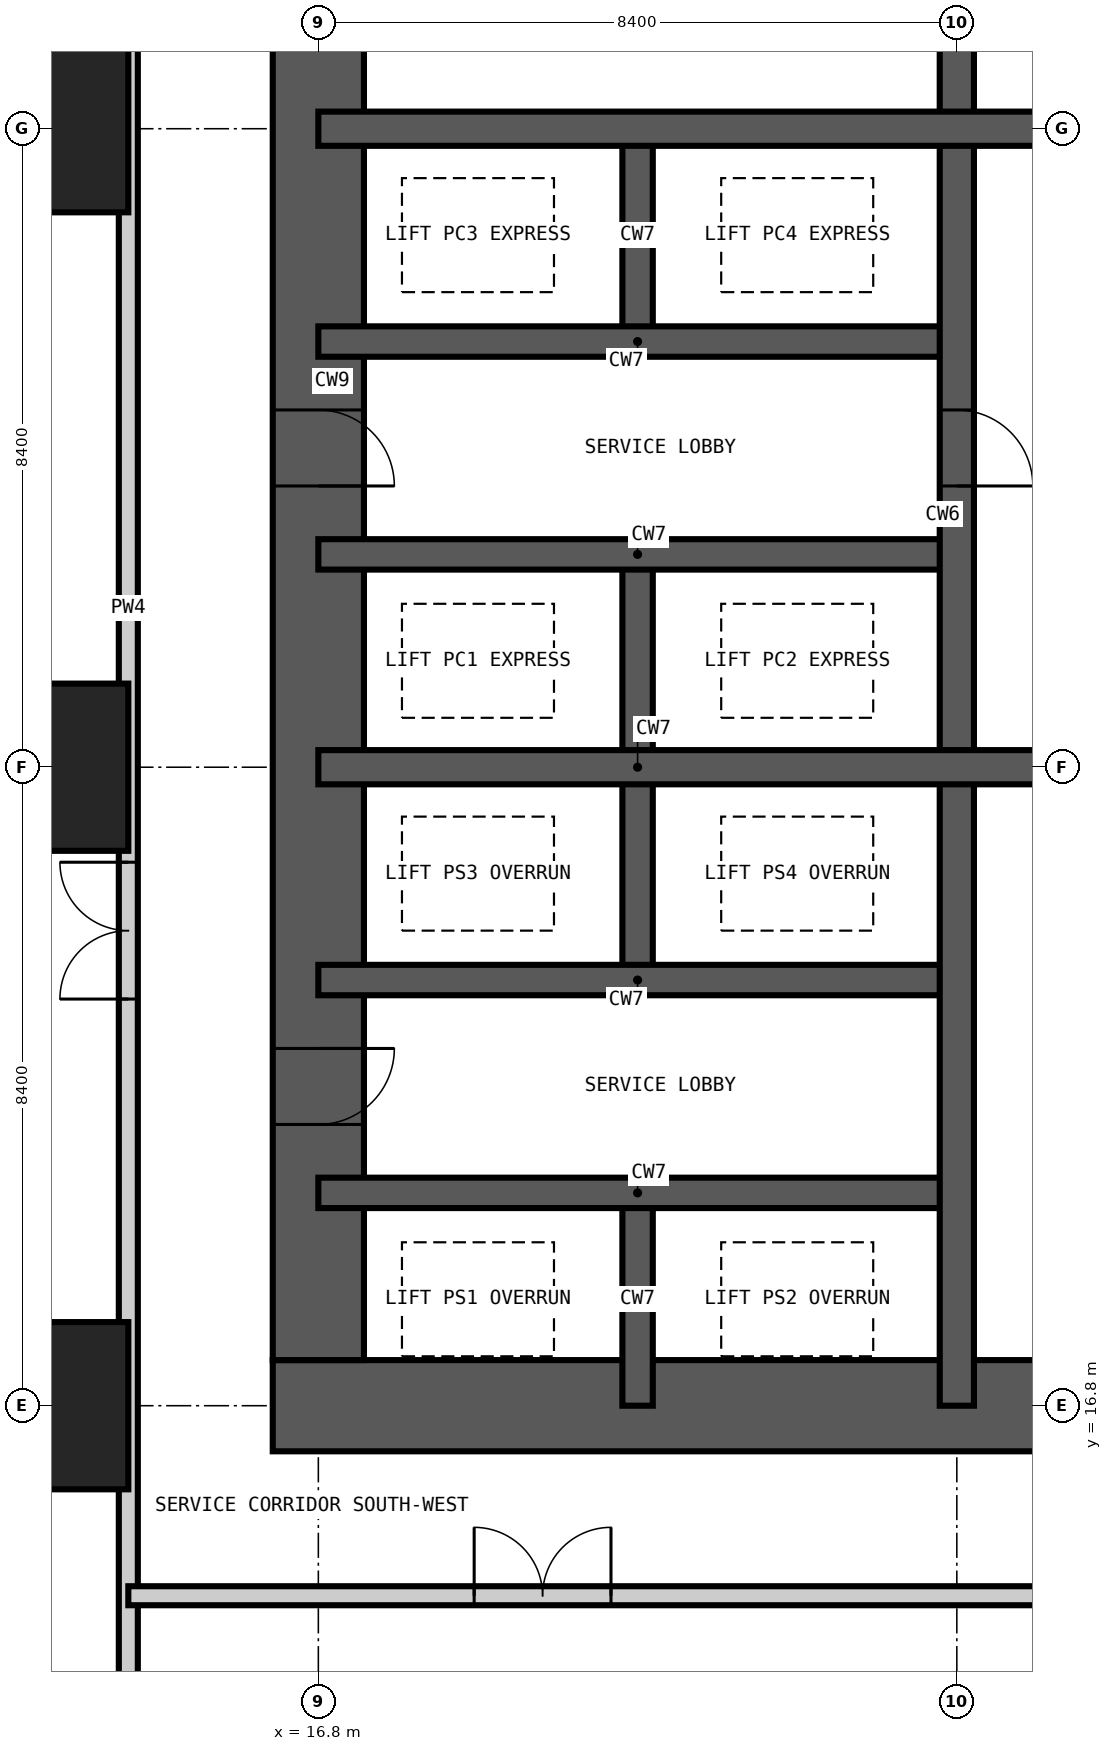
"""IFC4 building model, lengths in metres.
Left out: names, types, materials, properties, quantities, classifications, styles, units other than length and angle.
Written with IfcOpenShell. Run it as: python <this file> out.ifc"""

import sys

from ifc_helpers import new_model, si_unit, direction, frame, frame_2d, origin, origin_2d, place, context, subcontext, project, spatial, rectangle, extrude, element, fill, save


model = new_model("IFC4")
c1 = context("Model", 3, precision=1e-05, world=origin(), true_north=direction((0.0, 1.0)))
c2 = subcontext(c1, "Body", "Model", "MODEL_VIEW")
j1 = project(units=[si_unit("LENGTHUNIT", "METRE"), si_unit("PLANEANGLEUNIT", "RADIAN")], contexts=[c1])
p1 = place(None, origin())
s1 = spatial("IfcSite", under=j1, at=p1, CompositionType="ELEMENT")
p2 = place(p1, origin())
s2 = spatial("IfcBuilding", under=s1, at=p2, CompositionType="ELEMENT")
p3 = place(p2, frame((0.0, 0.0, 153.6)))
s3 = spatial("IfcBuildingStorey", under=s2, at=p3, CompositionType="ELEMENT", Elevation=153.6)
for number, where, z_axis, x_axis in (
    (1, (13.2, 16.8, -0.4), (0.0, 0.0, 1.0), (1.0, 0.0, 0.0)),
    (2, (13.2, 25.2, -0.4), (0.0, 0.0, 1.0), (1.0, 0.0, 0.0)),
    (3, (13.2, 33.6, -0.4), (0.0, 0.0, 1.0), (1.0, 0.0, 0.0)),
):
    element("IfcColumn", number, at=place(p3, frame(where, z_axis=z_axis, x_axis=x_axis)), inside=s3, PredefinedType="COLUMN", context=c2, shape_type="SweptSolid", body=[
        extrude(rectangle(XDim=2.2, YDim=2.2, at=origin_2d()), origin(), (0.0, 0.0, 1.0), 5.45),
    ])
p4 = place(p3, frame((16.2, 16.8, -0.4), z_axis=(0.0, 0.0, 1.0), x_axis=(1.0, 0.0, 0.0)))
e4 = element("IfcWall", 4, at=p4, inside=s3, PredefinedType="SHEAR", context=c2, shape_type="SweptSolid", body=[
    extrude(rectangle(XDim=26.4, YDim=1.2, at=frame_2d((13.2, 0.0))), origin(), (0.0, 0.0, 1.0), 5.45),
])
p5 = place(p4, frame((12.7, 0.0, 0.4)))
e5 = element("IfcOpeningElement", 5, at=p5, cuts=e4, PredefinedType="OPENING", context=c2, shape_type="SweptSolid", body=[
    extrude(rectangle(XDim=1.0, YDim=2.1, at=frame_2d((0.5, 1.05))), frame((0.0, 0.61, 0.0), z_axis=(0.0, -1.0, 0.0), x_axis=(1.0, 0.0, 0.0)), (0.0, 0.0, 1.0), 1.22),
])
p6 = place(p4, frame((19.0, 0.0, 0.4)))
e6 = element("IfcOpeningElement", 6, at=p6, cuts=e4, PredefinedType="OPENING", context=c2, shape_type="SweptSolid", body=[
    extrude(rectangle(XDim=1.0, YDim=2.1, at=frame_2d((0.5, 1.05))), frame((0.0, 0.61, 0.0), z_axis=(0.0, -1.0, 0.0), x_axis=(1.0, 0.0, 0.0)), (0.0, 0.0, 1.0), 1.22),
])
p7 = place(p3, frame((16.8, 41.4, -0.4), z_axis=(0.0, 0.0, 1.0), x_axis=(0.0, -1.0, 0.0)))
e7 = element("IfcWall", 7, at=p7, inside=s3, PredefinedType="SHEAR", context=c2, shape_type="SweptSolid", body=[
    extrude(rectangle(XDim=24.0, YDim=1.2, at=frame_2d((12.0, 0.0))), origin(), (0.0, 0.0, 1.0), 5.45),
])
p8 = place(p7, frame((11.5, 0.0, 0.4)))
e8 = element("IfcOpeningElement", 8, at=p8, cuts=e7, PredefinedType="OPENING", context=c2, shape_type="SweptSolid", body=[
    extrude(rectangle(XDim=1.0, YDim=2.1, at=frame_2d((0.5, 1.05))), frame((0.0, 0.61, 0.0), z_axis=(0.0, -1.0, 0.0), x_axis=(1.0, 0.0, 0.0)), (0.0, 0.0, 1.0), 1.22),
])
p9 = place(p7, frame((19.9, 0.0, 0.4)))
e9 = element("IfcOpeningElement", 9, at=p9, cuts=e7, PredefinedType="OPENING", context=c2, shape_type="SweptSolid", body=[
    extrude(rectangle(XDim=1.0, YDim=2.1, at=frame_2d((0.5, 1.05))), frame((0.0, 0.61, 0.0), z_axis=(0.0, -1.0, 0.0), x_axis=(1.0, 0.0, 0.0)), (0.0, 0.0, 1.0), 1.22),
])
p10 = place(p7, frame((5.2, 0.0, 0.4)))
e10 = element("IfcOpeningElement", 10, at=p10, cuts=e7, PredefinedType="OPENING", context=c2, shape_type="SweptSolid", body=[
    extrude(rectangle(XDim=1.0, YDim=2.1, at=frame_2d((0.5, 1.05))), frame((0.0, 0.61, 0.0), z_axis=(0.0, -1.0, 0.0), x_axis=(1.0, 0.0, 0.0)), (0.0, 0.0, 1.0), 1.22),
])
p11 = place(p3, frame((21.0, 16.8, -0.4), z_axis=(0.0, 0.0, 1.0), x_axis=(0.0, 1.0, 0.0)))
e11 = element("IfcWall", 11, at=p11, inside=s3, PredefinedType="SHEAR", context=c2, shape_type="SweptSolid", body=[
    extrude(rectangle(XDim=2.8, YDim=0.4, at=frame_2d((1.4, 0.0))), origin(), (0.0, 0.0, 1.0), 5.45),
])
p12 = place(p3, frame((21.0, 22.4, -0.4), z_axis=(0.0, 0.0, 1.0), x_axis=(0.0, 1.0, 0.0)))
e12 = element("IfcWall", 12, at=p12, inside=s3, PredefinedType="SHEAR", context=c2, shape_type="SweptSolid", body=[
    extrude(rectangle(XDim=5.6, YDim=0.4, at=frame_2d((2.8, 0.0))), origin(), (0.0, 0.0, 1.0), 5.45),
])
p13 = place(p3, frame((21.0, 30.8, -0.4), z_axis=(0.0, 0.0, 1.0), x_axis=(0.0, 1.0, 0.0)))
e13 = element("IfcWall", 13, at=p13, inside=s3, PredefinedType="SHEAR", context=c2, shape_type="SweptSolid", body=[
    extrude(rectangle(XDim=2.8, YDim=0.4, at=frame_2d((1.4, 0.0))), origin(), (0.0, 0.0, 1.0), 5.45),
])
for number, where, z_axis, x_axis in (
    (14, (16.8, 19.6, -0.4), (0.0, 0.0, 1.0), (1.0, 0.0, 0.0)),
    (15, (16.8, 22.4, -0.4), (0.0, 0.0, 1.0), (1.0, 0.0, 0.0)),
    (16, (16.8, 28.0, -0.4), (0.0, 0.0, 1.0), (1.0, 0.0, 0.0)),
    (17, (16.8, 30.8, -0.4), (0.0, 0.0, 1.0), (1.0, 0.0, 0.0)),
):
    element("IfcWall", number, at=place(p3, frame(where, z_axis=z_axis, x_axis=x_axis)), inside=s3, PredefinedType="SHEAR", context=c2, shape_type="SweptSolid", body=[
        extrude(rectangle(XDim=8.4, YDim=0.4, at=frame_2d((4.2, 0.0))), origin(), (0.0, 0.0, 1.0), 5.45),
    ])
p14 = place(p3, frame((25.2, 16.8, -0.4), z_axis=(0.0, 0.0, 1.0), x_axis=(0.0, 1.0, 0.0)))
e18 = element("IfcWall", 18, at=p14, inside=s3, PredefinedType="SHEAR", context=c2, shape_type="SweptSolid", body=[
    extrude(rectangle(XDim=25.2, YDim=0.45, at=frame_2d((12.6, 0.0))), origin(), (0.0, 0.0, 1.0), 5.45),
])
p15 = place(p14, frame((12.1, 0.0, 0.4)))
e19 = element("IfcOpeningElement", 19, at=p15, cuts=e18, PredefinedType="OPENING", context=c2, shape_type="SweptSolid", body=[
    extrude(rectangle(XDim=1.0, YDim=2.1, at=frame_2d((0.5, 1.05))), frame((0.0, 0.235, 0.0), z_axis=(0.0, -1.0, 0.0), x_axis=(1.0, 0.0, 0.0)), (0.0, 0.0, 1.0), 0.47),
])
for number, where, z_axis, x_axis in (
    (20, (16.8, 25.2, -0.4), (0.0, 0.0, 1.0), (1.0, 0.0, 0.0)),
    (21, (16.8, 33.6, -0.4), (0.0, 0.0, 1.0), (1.0, 0.0, 0.0)),
):
    element("IfcWall", number, at=place(p3, frame(where, z_axis=z_axis, x_axis=x_axis)), inside=s3, PredefinedType="SHEAR", context=c2, shape_type="SweptSolid", body=[
        extrude(rectangle(XDim=25.2, YDim=0.45, at=frame_2d((12.6, 0.0))), origin(), (0.0, 0.0, 1.0), 5.45),
    ])
p16 = place(p3, frame((14.3, -0.018, 0.0), z_axis=(0.0, 0.0, 1.0), x_axis=(0.0, 1.0, 0.0)))
e22 = element("IfcWall", 22, at=p16, inside=s3, PredefinedType="PARTITIONING", context=c2, shape_type="SweptSolid", body=[
    extrude(rectangle(XDim=54.636, YDim=0.25, at=frame_2d((27.318, 0.0))), origin(), (0.0, 0.0, 1.0), 5.05),
])
p17 = place(p16, frame((22.168, 0.0, 0.0)))
e23 = element("IfcOpeningElement", 23, at=p17, cuts=e22, PredefinedType="OPENING", context=c2, shape_type="SweptSolid", body=[
    extrude(rectangle(XDim=1.8, YDim=2.4, at=frame_2d((0.9, 1.2))), frame((0.0, 0.135, 0.0), z_axis=(0.0, -1.0, 0.0), x_axis=(1.0, 0.0, 0.0)), (0.0, 0.0, 1.0), 0.27),
])
p18 = place(p16, frame((38.168, 0.0, 0.0)))
e24 = element("IfcOpeningElement", 24, at=p18, cuts=e22, PredefinedType="OPENING", context=c2, shape_type="SweptSolid", body=[
    extrude(rectangle(XDim=1.8, YDim=2.4, at=frame_2d((0.9, 1.2))), frame((0.0, 0.135, 0.0), z_axis=(0.0, -1.0, 0.0), x_axis=(1.0, 0.0, 0.0)), (0.0, 0.0, 1.0), 0.27),
])
p19 = place(p3, frame((14.3, 14.3, 0.0), z_axis=(0.0, 0.0, 1.0), x_axis=(1.0, 0.0, 0.0)))
e25 = element("IfcWall", 25, at=p19, inside=s3, PredefinedType="PARTITIONING", context=c2, shape_type="SweptSolid", body=[
    extrude(rectangle(XDim=30.2, YDim=0.25, at=frame_2d((15.1, 0.0))), origin(), (0.0, 0.0, 1.0), 5.05),
])
p20 = place(p19, frame((19.65, 0.0, 0.0)))
e26 = element("IfcOpeningElement", 26, at=p20, cuts=e25, PredefinedType="OPENING", context=c2, shape_type="SweptSolid", body=[
    extrude(rectangle(XDim=1.8, YDim=2.4, at=frame_2d((0.9, 1.2))), frame((0.0, 0.135, 0.0), z_axis=(0.0, -1.0, 0.0), x_axis=(1.0, 0.0, 0.0)), (0.0, 0.0, 1.0), 0.27),
])
p21 = place(p19, frame((4.55, 0.0, 0.0)))
e27 = element("IfcOpeningElement", 27, at=p21, cuts=e25, PredefinedType="OPENING", context=c2, shape_type="SweptSolid", body=[
    extrude(rectangle(XDim=1.8, YDim=2.4, at=frame_2d((0.9, 1.2))), frame((0.0, 0.135, 0.0), z_axis=(0.0, -1.0, 0.0), x_axis=(1.0, 0.0, 0.0)), (0.0, 0.0, 1.0), 0.27),
])
p22 = place(p17, origin())
e28 = element("IfcDoor", 28, at=p22, inside=s3, OperationType="DOUBLE_DOOR_DOUBLE_SWING", PredefinedType="DOOR", context=c2, shape_type="SweptSolid", body=[
    extrude(rectangle(XDim=1.8, YDim=2.4, at=frame_2d((0.9, 1.2))), frame((0.0, 0.025, 0.0), z_axis=(0.0, -1.0, 0.0), x_axis=(1.0, 0.0, 0.0)), (0.0, 0.0, 1.0), 0.05),
])
fill(e23, e28)
p23 = place(p21, origin())
e29 = element("IfcDoor", 29, at=p23, inside=s3, OperationType="DOUBLE_DOOR_DOUBLE_SWING", PredefinedType="DOOR", context=c2, shape_type="SweptSolid", body=[
    extrude(rectangle(XDim=1.8, YDim=2.4, at=frame_2d((0.9, 1.2))), frame((0.0, 0.025, 0.0), z_axis=(0.0, -1.0, 0.0), x_axis=(1.0, 0.0, 0.0)), (0.0, 0.0, 1.0), 0.05),
])
fill(e27, e29)
p24 = place(p8, origin())
e30 = element("IfcDoor", 30, at=p24, inside=s3, OperationType="SINGLE_SWING_RIGHT", PredefinedType="DOOR", context=c2, shape_type="SweptSolid", body=[
    extrude(rectangle(XDim=1.0, YDim=2.1, at=frame_2d((0.5, 1.05))), frame((0.0, 0.025, 0.0), z_axis=(0.0, -1.0, 0.0), x_axis=(1.0, 0.0, 0.0)), (0.0, 0.0, 1.0), 0.05),
])
fill(e8, e30)
p25 = place(p9, origin())
e31 = element("IfcDoor", 31, at=p25, inside=s3, OperationType="SINGLE_SWING_LEFT", PredefinedType="DOOR", context=c2, shape_type="SweptSolid", body=[
    extrude(rectangle(XDim=1.0, YDim=2.1, at=frame_2d((0.5, 1.05))), frame((0.0, 0.025, 0.0), z_axis=(0.0, -1.0, 0.0), x_axis=(1.0, 0.0, 0.0)), (0.0, 0.0, 1.0), 0.05),
])
fill(e9, e31)
p26 = place(p15, frame((1.0, 0.0, 0.0), z_axis=(0.0, 0.0, 1.0), x_axis=(-1.0, 0.0, 0.0)))
e32 = element("IfcDoor", 32, at=p26, inside=s3, OperationType="SINGLE_SWING_RIGHT", PredefinedType="DOOR", context=c2, shape_type="SweptSolid", body=[
    extrude(rectangle(XDim=1.0, YDim=2.1, at=frame_2d((0.5, 1.05))), frame((0.0, 0.025, 0.0), z_axis=(0.0, -1.0, 0.0), x_axis=(1.0, 0.0, 0.0)), (0.0, 0.0, 1.0), 0.05),
])
fill(e19, e32)
save(model, sys.argv[1])
